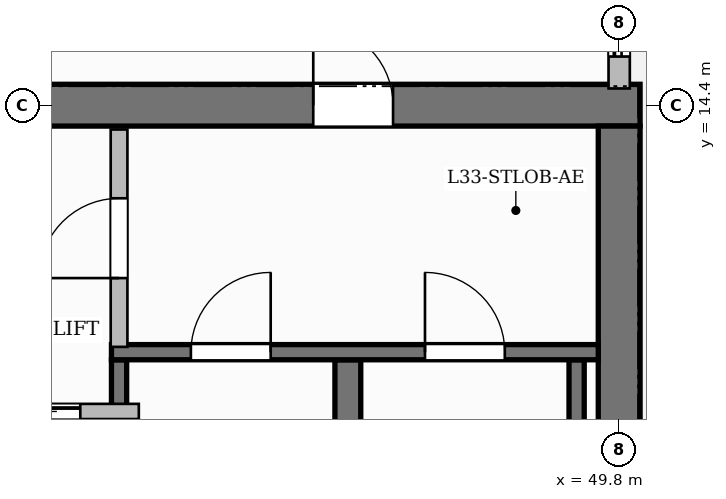
"""IFC4 building model, lengths in metres.
Left out: names, types, materials, properties, quantities, classifications, styles, units other than length and angle.
Written with IfcOpenShell. Run it as: python <this file> out.ifc"""

import sys

from ifc_helpers import new_model, si_unit, direction, frame, frame_2d, origin, place, context, subcontext, project, spatial, rectangle, extrude, source, transform, mapped, element, fill, save


model = new_model("IFC4")
c1 = context("Model", 3, precision=1e-05, world=origin(), true_north=direction((0.0, 1.0)))
c2 = subcontext(c1, "Body", "Model", "MODEL_VIEW")
j1 = project(units=[si_unit("LENGTHUNIT", "METRE"), si_unit("PLANEANGLEUNIT", "RADIAN")], contexts=[c1])
p1 = place(None, origin())
s1 = spatial("IfcSite", under=j1, at=p1, CompositionType="ELEMENT")
p2 = place(p1, origin())
s2 = spatial("IfcBuilding", under=s1, at=p2, CompositionType="ELEMENT")
p3 = place(p2, frame((0.0, 0.0, 134.0)))
s3 = spatial("IfcBuildingStorey", under=s2, at=p3, CompositionType="ELEMENT", Elevation=134.0)
p4 = place(p3, frame((34.525, 14.4, 0.0), z_axis=(0.0, 0.0, 1.0), x_axis=(1.0, 0.0, 0.0)))
e1 = element("IfcWall", 1, at=p4, inside=s3, PredefinedType="SHEAR", context=c2, shape_type="SweptSolid", body=[
    extrude(rectangle(XDim=15.55, YDim=0.55, at=frame_2d((7.775, 0.0))), origin(), (0.0, 0.0, 1.0), 3.7),
])
p5 = place(p4, frame((5.405, 0.0, 0.0)))
e2 = element("IfcOpeningElement", 2, at=p5, cuts=e1, PredefinedType="OPENING", context=c2, shape_type="SweptSolid", body=[
    extrude(rectangle(XDim=1.5, YDim=2.2, at=frame_2d((0.75, 1.1))), frame((0.0, 0.285, 0.0), z_axis=(0.0, -1.0, 0.0), x_axis=(1.0, 0.0, 0.0)), (0.0, 0.0, 1.0), 0.57),
])
p6 = place(p4, frame((1.62, 0.0, 0.0)))
e3 = element("IfcOpeningElement", 3, at=p6, cuts=e1, PredefinedType="OPENING", context=c2, shape_type="SweptSolid", body=[
    extrude(rectangle(XDim=1.05, YDim=2.15, at=frame_2d((0.525, 1.075))), frame((0.0, 0.285, 0.0), z_axis=(0.0, -1.0, 0.0), x_axis=(1.0, 0.0, 0.0)), (0.0, 0.0, 1.0), 0.57),
])
p7 = place(p4, frame((11.25, 0.0, 0.0)))
e4 = element("IfcOpeningElement", 4, at=p7, cuts=e1, PredefinedType="OPENING", context=c2, shape_type="SweptSolid", body=[
    extrude(rectangle(XDim=1.05, YDim=2.15, at=frame_2d((0.525, 1.075))), frame((0.0, 0.285, 0.0), z_axis=(0.0, -1.0, 0.0), x_axis=(1.0, 0.0, 0.0)), (0.0, 0.0, 1.0), 0.57),
])
p8 = place(p3, frame((49.8, 3.875, 0.0), z_axis=(0.0, 0.0, 1.0), x_axis=(0.0, 1.0, 0.0)))
e5 = element("IfcWall", 5, at=p8, inside=s3, PredefinedType="SHEAR", context=c2, shape_type="SweptSolid", body=[
    extrude(rectangle(XDim=10.25, YDim=0.55, at=frame_2d((5.125, 0.0))), origin(), (0.0, 0.0, 1.0), 3.7),
])
p9 = place(p3, frame((43.22, 4.1, 0.0), z_axis=(0.0, 0.0, 1.0), x_axis=(0.0, 1.0, 0.0)))
e6 = element("IfcWall", 6, at=p9, inside=s3, PredefinedType="SHEAR", context=c2, shape_type="SweptSolid", body=[
    extrude(rectangle(XDim=6.95, YDim=0.2, at=frame_2d((3.475, 0.0))), origin(), (0.0, 0.0, 1.0), 3.7),
])
p10 = place(p3, frame((46.23, 4.1, 0.0), z_axis=(0.0, 0.0, 1.0), x_axis=(0.0, 1.0, 0.0)))
e7 = element("IfcWall", 7, at=p10, inside=s3, PredefinedType="SHEAR", context=c2, shape_type="SweptSolid", body=[
    extrude(rectangle(XDim=6.95, YDim=0.34, at=frame_2d((3.475, 0.0))), origin(), (0.0, 0.0, 1.0), 3.7),
])
p11 = place(p3, frame((49.24, 4.1, 0.0), z_axis=(0.0, 0.0, 1.0), x_axis=(0.0, 1.0, 0.0)))
e8 = element("IfcWall", 8, at=p11, inside=s3, PredefinedType="SHEAR", context=c2, shape_type="SweptSolid", body=[
    extrude(rectangle(XDim=6.95, YDim=0.2, at=frame_2d((3.475, 0.0))), origin(), (0.0, 0.0, 1.0), 3.7),
])
p12 = place(p3, frame((43.12, 11.15, 0.0), z_axis=(0.0, 0.0, 1.0), x_axis=(1.0, 0.0, 0.0)))
e9 = element("IfcWall", 9, at=p12, inside=s3, PredefinedType="SHEAR", context=c2, shape_type="SweptSolid", body=[
    extrude(rectangle(XDim=6.405, YDim=0.2, at=frame_2d((3.202, 0.0))), origin(), (0.0, 0.0, 1.0), 3.7),
])
p13 = place(p12, frame((1.045, 0.0, 0.0)))
e10 = element("IfcOpeningElement", 10, at=p13, cuts=e9, PredefinedType="OPENING", context=c2, shape_type="SweptSolid", body=[
    extrude(rectangle(XDim=1.05, YDim=2.2, at=frame_2d((0.525, 1.1))), frame((0.0, 0.11, 0.0), z_axis=(0.0, -1.0, 0.0), x_axis=(1.0, 0.0, 0.0)), (0.0, 0.0, 1.0), 0.22),
])
p14 = place(p12, frame((4.125, 0.0, 0.0)))
e11 = element("IfcOpeningElement", 11, at=p14, cuts=e9, PredefinedType="OPENING", context=c2, shape_type="SweptSolid", body=[
    extrude(rectangle(XDim=1.05, YDim=2.2, at=frame_2d((0.525, 1.1))), frame((0.0, 0.11, 0.0), z_axis=(0.0, -1.0, 0.0), x_axis=(1.0, 0.0, 0.0)), (0.0, 0.0, 1.0), 0.22),
])
p15 = place(p3, frame((43.22, 11.22, 0.0), z_axis=(0.0, 0.0, 1.0), x_axis=(0.0, 1.0, 0.0)))
e12 = element("IfcWall", 12, at=p15, inside=s3, PredefinedType="PARTITIONING", context=c2, shape_type="SweptSolid", body=[
    extrude(rectangle(XDim=2.86, YDim=0.22, at=frame_2d((1.43, 0.0))), origin(), (0.0, 0.0, 1.0), 3.45),
])
p16 = place(p15, frame((0.905, 0.0, 0.0)))
e13 = element("IfcOpeningElement", 13, at=p16, cuts=e12, PredefinedType="OPENING", context=c2, shape_type="SweptSolid", body=[
    extrude(rectangle(XDim=1.05, YDim=2.15, at=frame_2d((0.525, 1.075))), frame((0.0, 0.12, 0.0), z_axis=(0.0, -1.0, 0.0), x_axis=(1.0, 0.0, 0.0)), (0.0, 0.0, 1.0), 0.24),
])
p17 = place(p3, frame((40.84, 10.37, 0.0), z_axis=(0.0, 0.0, 1.0), x_axis=(1.0, 0.0, 0.0)))
e14 = element("IfcWall", 14, at=p17, inside=s3, PredefinedType="PARTITIONING", context=c2, shape_type="SweptSolid", body=[
    extrude(rectangle(XDim=2.64, YDim=0.2, at=frame_2d((1.32, 0.0))), origin(), (0.0, 0.0, 1.0), 3.45),
])
p18 = place(p17, frame((0.77, 0.0, 0.0)))
e15 = element("IfcOpeningElement", 15, at=p18, cuts=e14, PredefinedType="OPENING", context=c2, shape_type="SweptSolid", body=[
    extrude(rectangle(XDim=1.1, YDim=2.2, at=frame_2d((0.55, 1.1))), frame((0.0, 0.11, 0.0), z_axis=(0.0, -1.0, 0.0), x_axis=(1.0, 0.0, 0.0)), (0.0, 0.0, 1.0), 0.22),
])
p19 = place(p3, frame((49.8, 14.62, 0.0), z_axis=(0.0, 0.0, 1.0), x_axis=(0.0, 1.0, 0.0)))
e16 = element("IfcWall", 16, at=p19, inside=s3, PredefinedType="SOLIDWALL", context=c2, shape_type="SweptSolid", body=[
    extrude(rectangle(XDim=6.93, YDim=0.28, at=frame_2d((3.465, 0.0))), origin(), (0.0, 0.0, 1.0), 2.935),
])
p20 = place(p19, frame((0.42, 0.0, 0.0)))
e17 = element("IfcOpeningElement", 17, at=p20, cuts=e16, PredefinedType="OPENING", context=c2, shape_type="SweptSolid", body=[
    extrude(rectangle(XDim=1.2, YDim=2.2, at=frame_2d((0.6, 1.1))), frame((0.0, 0.15, 0.0), z_axis=(0.0, -1.0, 0.0), x_axis=(1.0, 0.0, 0.0)), (0.0, 0.0, 1.0), 0.3),
])
p21 = place(p19, frame((3.384, 0.0, 0.8)))
e18 = element("IfcOpeningElement", 18, at=p21, cuts=e16, PredefinedType="OPENING", context=c2, shape_type="SweptSolid", body=[
    extrude(rectangle(XDim=1.8, YDim=1.85, at=frame_2d((0.9, 0.925))), frame((0.0, 0.15, 0.0), z_axis=(0.0, -1.0, 0.0), x_axis=(1.0, 0.0, 0.0)), (0.0, 0.0, 1.0), 0.3),
])
m1 = source(origin(), c2, "Body", "SweptSolid", [
    extrude(rectangle(XDim=1.05, YDim=2.2, at=frame_2d((0.525, 1.1))), frame((0.0, 0.025, 0.0), z_axis=(0.0, -1.0, 0.0), x_axis=(1.0, 0.0, 0.0)), (0.0, 0.0, 1.0), 0.05),
])
p22 = place(p13, origin())
e19 = element("IfcDoor", 19, at=p22, inside=s3, OperationType="SINGLE_SWING_RIGHT", PredefinedType="DOOR", context=c2, shape_type="MappedRepresentation", body=[
    mapped(m1, transform((0.0, 0.0, 0.0), scale=1.0)),
])
fill(e10, e19)
p23 = place(p14, origin())
e20 = element("IfcDoor", 20, at=p23, inside=s3, OperationType="SINGLE_SWING_LEFT", PredefinedType="DOOR", context=c2, shape_type="MappedRepresentation", body=[
    mapped(m1, transform((0.0, 0.0, 0.0), scale=1.0)),
])
fill(e11, e20)
m2 = source(origin(), c2, "Body", "SweptSolid", [
    extrude(rectangle(XDim=1.05, YDim=2.15, at=frame_2d((0.525, 1.075))), frame((0.0, 0.025, 0.0), z_axis=(0.0, -1.0, 0.0), x_axis=(1.0, 0.0, 0.0)), (0.0, 0.0, 1.0), 0.05),
])
p24 = place(p16, origin())
e21 = element("IfcDoor", 21, at=p24, inside=s3, OperationType="SINGLE_SWING_LEFT", PredefinedType="DOOR", context=c2, shape_type="MappedRepresentation", body=[
    mapped(m2, transform((0.0, 0.0, 0.0), scale=1.0)),
])
fill(e13, e21)
p25 = place(p7, origin())
e22 = element("IfcDoor", 22, at=p25, inside=s3, OperationType="SINGLE_SWING_LEFT", PredefinedType="DOOR", context=c2, shape_type="MappedRepresentation", body=[
    mapped(m2, transform((0.0, 0.0, 0.0), scale=1.0)),
])
fill(e4, e22)
m3 = source(origin(), c2, "Body", "SweptSolid", [
    extrude(rectangle(XDim=1.1, YDim=2.2, at=frame_2d((0.55, 1.1))), frame((0.0, 0.025, 0.0), z_axis=(0.0, -1.0, 0.0), x_axis=(1.0, 0.0, 0.0)), (0.0, 0.0, 1.0), 0.05),
])
p26 = place(p18, origin())
e23 = element("IfcDoor", 23, at=p26, inside=s3, OperationType="SLIDING_TO_LEFT", PredefinedType="DOOR", context=c2, shape_type="MappedRepresentation", body=[
    mapped(m3, transform((0.0, 0.0, 0.0), scale=1.0)),
])
fill(e15, e23)
m4 = source(origin(), c2, "Body", "SweptSolid", [
    extrude(rectangle(XDim=1.2, YDim=2.2, at=frame_2d((0.6, 1.1))), frame((0.0, 0.025, 0.0), z_axis=(0.0, -1.0, 0.0), x_axis=(1.0, 0.0, 0.0)), (0.0, 0.0, 1.0), 0.05),
])
p27 = place(p20, origin())
e24 = element("IfcDoor", 24, at=p27, inside=s3, OperationType="SLIDING_TO_LEFT", PredefinedType="DOOR", context=c2, shape_type="MappedRepresentation", body=[
    mapped(m4, transform((0.0, 0.0, 0.0), scale=1.0)),
])
fill(e17, e24)
save(model, sys.argv[1])
